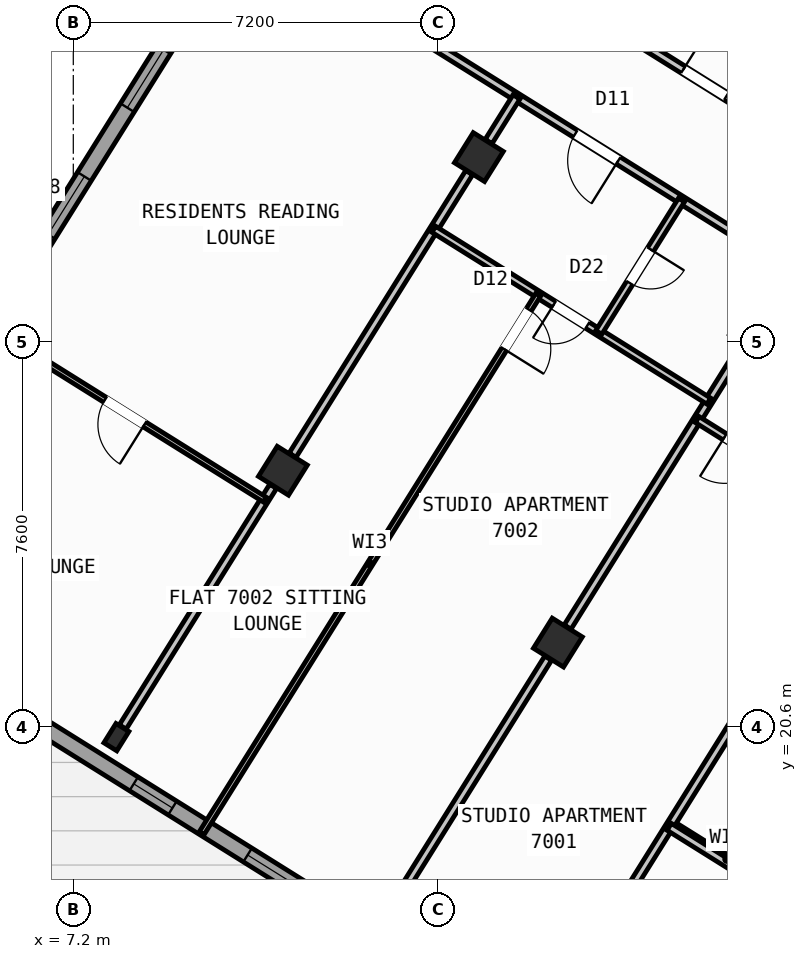
"""IFC4 building model, lengths in metres.
Left out: names, types, materials, properties, quantities, classifications, styles, units other than length and angle.
Written with IfcOpenShell. Run it as: python <this file> out.ifc"""

import sys

from ifc_helpers import new_model, si_unit, direction, frame, frame_2d, origin, origin_2d, place, context, subcontext, project, spatial, rectangle, hollow_rectangle, i_section, extrude, source, transform, mapped, element, fill, save


model = new_model("IFC4")
c1 = context("Model", 3, precision=1e-05, world=origin(), true_north=direction((0.0, 1.0)))
c2 = subcontext(c1, "Body", "Model", "MODEL_VIEW")
j1 = project(units=[si_unit("LENGTHUNIT", "METRE"), si_unit("PLANEANGLEUNIT", "RADIAN")], contexts=[c1])
p1 = place(None, origin())
s1 = spatial("IfcSite", under=j1, at=p1, CompositionType="ELEMENT")
p2 = place(p1, origin())
s2 = spatial("IfcBuilding", under=s1, at=p2, CompositionType="ELEMENT")
p3 = place(p2, frame((0.0, 0.0, 277.2)))
s3 = spatial("IfcBuildingStorey", under=s2, at=p3, CompositionType="ELEMENT", Elevation=277.2)
m1 = source(origin(), c2, "Body", "SweptSolid", [
    extrude(hollow_rectangle(XDim=0.7, YDim=0.7, WallThickness=0.028, at=origin_2d()), origin(), (0.0, 0.0, 1.0), 3.6),
])
for number, where, z_axis, x_axis in (
    (1, (16.764, 22.261, 0.0), (0.0, 0.0, 1.0), (-0.848, 0.53, 0.0)),
    (2, (15.205, 31.844, 0.0), (0.0, 0.0, 1.0), (-0.848, 0.53, 0.0)),
    (3, (11.336, 25.653, 0.0), (0.0, 0.0, 1.0), (-0.848, 0.53, 0.0)),
):
    element("IfcColumn", number, at=place(p3, frame(where, z_axis=z_axis, x_axis=x_axis)), inside=s3, PredefinedType="COLUMN", context=c2, shape_type="MappedRepresentation", body=[
        mapped(m1, transform((0.0, 0.0, 0.0), scale=1.0)),
    ])
m2 = source(origin(), c2, "Body", "SweptSolid", [
    extrude(i_section(OverallWidth=0.3, OverallDepth=0.45, WebThickness=0.014, FlangeThickness=0.026, at=origin_2d()), origin(), (0.0, 0.0, 1.0), 3.6),
])
p4 = place(p3, frame((8.051, 20.395, 0.0), z_axis=(0.0, 0.0, 1.0), x_axis=(-0.848048096156, 0.529919264233, 0.0)))
e4 = element("IfcColumn", 4, at=p4, inside=s3, PredefinedType="COLUMN", context=c2, shape_type="MappedRepresentation", body=[
    mapped(m2, transform((0.0, 0.0, 0.0), scale=1.0)),
])
p5 = place(p3, frame((29.268, 6.429, 0.0), z_axis=(0.0, 0.0, 1.0), x_axis=(-0.848049971435, 0.529916263149, 0.0)))
e5 = element("IfcWall", 5, at=p5, inside=s3, PredefinedType="STANDARD", context=c2, shape_type="SweptSolid", body=[
    extrude(rectangle(XDim=31.588, YDim=0.32, at=frame_2d((15.794, 0.0))), origin(), (0.0, 0.0, 1.0), 3.35),
])
p6 = place(p5, frame((16.362, 0.0, 0.0)))
e6 = element("IfcOpeningElement", 6, at=p6, cuts=e5, PredefinedType="OPENING", context=c2, shape_type="SweptSolid", body=[
    extrude(rectangle(XDim=1.2, YDim=2.15, at=frame_2d((0.6, 1.075))), frame((0.0, 0.17, 0.0), z_axis=(0.0, -1.0, 0.0), x_axis=(1.0, 0.0, 0.0)), (0.0, 0.0, 1.0), 0.34),
])
p7 = place(p5, frame((3.859, 0.0, 0.9)))
e7 = element("IfcOpeningElement", 7, at=p7, cuts=e5, PredefinedType="OPENING", context=c2, shape_type="SweptSolid", body=[
    extrude(rectangle(XDim=1.65, YDim=1.45, at=frame_2d((0.825, 0.725))), frame((0.0, 0.17, 0.0), z_axis=(0.0, -1.0, 0.0), x_axis=(1.0, 0.0, 0.0)), (0.0, 0.0, 1.0), 0.34),
])
p8 = place(p5, frame((10.519, 0.0, 0.9)))
e8 = element("IfcOpeningElement", 8, at=p8, cuts=e5, PredefinedType="OPENING", context=c2, shape_type="SweptSolid", body=[
    extrude(rectangle(XDim=1.65, YDim=1.45, at=frame_2d((0.825, 0.725))), frame((0.0, 0.17, 0.0), z_axis=(0.0, -1.0, 0.0), x_axis=(1.0, 0.0, 0.0)), (0.0, 0.0, 1.0), 0.34),
])
p9 = place(p5, frame((20.015, 0.0, 0.95)))
e9 = element("IfcOpeningElement", 9, at=p9, cuts=e5, PredefinedType="OPENING", context=c2, shape_type="SweptSolid", body=[
    extrude(rectangle(XDim=1.95, YDim=1.35, at=frame_2d((0.975, 0.675))), frame((0.0, 0.17, 0.0), z_axis=(0.0, -1.0, 0.0), x_axis=(1.0, 0.0, 0.0)), (0.0, 0.0, 1.0), 0.34),
])
p10 = place(p5, frame((23.715, 0.0, 1.0)))
e10 = element("IfcOpeningElement", 10, at=p10, cuts=e5, PredefinedType="OPENING", context=c2, shape_type="SweptSolid", body=[
    extrude(rectangle(XDim=0.9, YDim=1.25, at=frame_2d((0.45, 0.625))), frame((0.0, 0.17, 0.0), z_axis=(0.0, -1.0, 0.0), x_axis=(1.0, 0.0, 0.0)), (0.0, 0.0, 1.0), 0.34),
])
p11 = place(p5, frame((27.706, 0.0, 0.9)))
e11 = element("IfcOpeningElement", 11, at=p11, cuts=e5, PredefinedType="OPENING", context=c2, shape_type="SweptSolid", body=[
    extrude(rectangle(XDim=1.65, YDim=1.45, at=frame_2d((0.825, 0.725))), frame((0.0, 0.17, 0.0), z_axis=(0.0, -1.0, 0.0), x_axis=(1.0, 0.0, 0.0)), (0.0, 0.0, 1.0), 0.34),
])
p12 = place(p3, frame((2.415, 23.452, 0.0), z_axis=(0.0, 0.0, 1.0), x_axis=(0.52991049553, 0.848053575387, 0.0)))
e12 = element("IfcWall", 12, at=p12, inside=s3, PredefinedType="STANDARD", context=c2, shape_type="SweptSolid", body=[
    extrude(rectangle(XDim=21.587, YDim=0.32, at=frame_2d((10.794, 0.0))), origin(), (0.0, 0.0, 1.0), 3.35),
])
p13 = place(p12, frame((2.368, 0.0, 0.9)))
e13 = element("IfcOpeningElement", 13, at=p13, cuts=e12, PredefinedType="OPENING", context=c2, shape_type="SweptSolid", body=[
    extrude(rectangle(XDim=1.65, YDim=1.45, at=frame_2d((0.825, 0.725))), frame((0.0, 0.17, 0.0), z_axis=(0.0, -1.0, 0.0), x_axis=(1.0, 0.0, 0.0)), (0.0, 0.0, 1.0), 0.34),
])
p14 = place(p12, frame((8.094, 0.0, 0.9)))
e14 = element("IfcOpeningElement", 14, at=p14, cuts=e12, PredefinedType="OPENING", context=c2, shape_type="SweptSolid", body=[
    extrude(rectangle(XDim=1.35, YDim=1.45, at=frame_2d((0.675, 0.725))), frame((0.0, 0.17, 0.0), z_axis=(0.0, -1.0, 0.0), x_axis=(1.0, 0.0, 0.0)), (0.0, 0.0, 1.0), 0.34),
])
p15 = place(p12, frame((11.044, 0.0, 0.9)))
e15 = element("IfcOpeningElement", 15, at=p15, cuts=e12, PredefinedType="OPENING", context=c2, shape_type="SweptSolid", body=[
    extrude(rectangle(XDim=1.35, YDim=1.45, at=frame_2d((0.675, 0.725))), frame((0.0, 0.17, 0.0), z_axis=(0.0, -1.0, 0.0), x_axis=(1.0, 0.0, 0.0)), (0.0, 0.0, 1.0), 0.34),
])
p16 = place(p12, frame((18.809, 0.0, 1.0)))
e16 = element("IfcOpeningElement", 16, at=p16, cuts=e12, PredefinedType="OPENING", context=c2, shape_type="SweptSolid", body=[
    extrude(rectangle(XDim=0.9, YDim=1.25, at=frame_2d((0.45, 0.625))), frame((0.0, 0.17, 0.0), z_axis=(0.0, -1.0, 0.0), x_axis=(1.0, 0.0, 0.0)), (0.0, 0.0, 1.0), 0.34),
])
p17 = place(p3, frame((14.138, 41.825, 0.0), z_axis=(0.0, 0.0, 1.0), x_axis=(0.848046498049, -0.529921821731, 0.0)))
e17 = element("IfcWall", 17, at=p17, inside=s3, PredefinedType="STANDARD", context=c2, shape_type="SweptSolid", body=[
    extrude(rectangle(XDim=31.588, YDim=0.32, at=frame_2d((15.794, 0.0))), origin(), (0.0, 0.0, 1.0), 3.35),
])
p18 = place(p17, frame((3.568, 0.0, 0.0)))
e18 = element("IfcOpeningElement", 18, at=p18, cuts=e17, PredefinedType="OPENING", context=c2, shape_type="SweptSolid", body=[
    extrude(rectangle(XDim=1.05, YDim=2.15, at=frame_2d((0.525, 1.075))), frame((0.0, 0.17, 0.0), z_axis=(0.0, -1.0, 0.0), x_axis=(1.0, 0.0, 0.0)), (0.0, 0.0, 1.0), 0.34),
])
p19 = place(p17, frame((1.046, 0.0, 0.9)))
e19 = element("IfcOpeningElement", 19, at=p19, cuts=e17, PredefinedType="OPENING", context=c2, shape_type="SweptSolid", body=[
    extrude(rectangle(XDim=1.65, YDim=1.45, at=frame_2d((0.825, 0.725))), frame((0.0, 0.17, 0.0), z_axis=(0.0, -1.0, 0.0), x_axis=(1.0, 0.0, 0.0)), (0.0, 0.0, 1.0), 0.34),
])
p20 = place(p17, frame((8.61, 0.0, 0.9)))
e20 = element("IfcOpeningElement", 20, at=p20, cuts=e17, PredefinedType="OPENING", context=c2, shape_type="SweptSolid", body=[
    extrude(rectangle(XDim=1.35, YDim=1.45, at=frame_2d((0.675, 0.725))), frame((0.0, 0.17, 0.0), z_axis=(0.0, -1.0, 0.0), x_axis=(1.0, 0.0, 0.0)), (0.0, 0.0, 1.0), 0.34),
])
p21 = place(p17, frame((13.599, 0.0, 0.95)))
e21 = element("IfcOpeningElement", 21, at=p21, cuts=e17, PredefinedType="OPENING", context=c2, shape_type="SweptSolid", body=[
    extrude(rectangle(XDim=1.95, YDim=1.35, at=frame_2d((0.975, 0.675))), frame((0.0, 0.17, 0.0), z_axis=(0.0, -1.0, 0.0), x_axis=(1.0, 0.0, 0.0)), (0.0, 0.0, 1.0), 0.34),
])
p22 = place(p17, frame((17.154, 0.0, 1.0)))
e22 = element("IfcOpeningElement", 22, at=p22, cuts=e17, PredefinedType="OPENING", context=c2, shape_type="SweptSolid", body=[
    extrude(rectangle(XDim=0.9, YDim=1.25, at=frame_2d((0.45, 0.625))), frame((0.0, 0.17, 0.0), z_axis=(0.0, -1.0, 0.0), x_axis=(1.0, 0.0, 0.0)), (0.0, 0.0, 1.0), 0.34),
])
p23 = place(p17, frame((21.719, 0.0, 0.9)))
e23 = element("IfcOpeningElement", 23, at=p23, cuts=e17, PredefinedType="OPENING", context=c2, shape_type="SweptSolid", body=[
    extrude(rectangle(XDim=1.65, YDim=1.45, at=frame_2d((0.825, 0.725))), frame((0.0, 0.17, 0.0), z_axis=(0.0, -1.0, 0.0), x_axis=(1.0, 0.0, 0.0)), (0.0, 0.0, 1.0), 0.34),
])
p24 = place(p17, frame((27.419, 0.0, 0.9)))
e24 = element("IfcOpeningElement", 24, at=p24, cuts=e17, PredefinedType="OPENING", context=c2, shape_type="SweptSolid", body=[
    extrude(rectangle(XDim=1.65, YDim=1.45, at=frame_2d((0.825, 0.725))), frame((0.0, 0.17, 0.0), z_axis=(0.0, -1.0, 0.0), x_axis=(1.0, 0.0, 0.0)), (0.0, 0.0, 1.0), 0.34),
])
p25 = place(p3, frame((21.206, 17.292, 0.0), z_axis=(0.0, 0.0, 1.0), x_axis=(-0.848050851465, 0.529914854792, 0.0)))
e25 = element("IfcWall", 25, at=p25, inside=s3, PredefinedType="PARTITIONING", context=c2, shape_type="SweptSolid", body=[
    extrude(rectangle(XDim=2.61, YDim=0.16, at=frame_2d((1.305, 0.0))), origin(), (0.0, 0.0, 1.0), 3.34),
])
p26 = place(p3, frame((24.588, 27.631, 0.0), z_axis=(0.0, 0.0, 1.0), x_axis=(-0.529914586043, -0.848051019396, 0.0)))
e26 = element("IfcWall", 26, at=p26, inside=s3, PredefinedType="PARTITIONING", context=c2, shape_type="SweptSolid", body=[
    extrude(rectangle(XDim=15.35, YDim=0.16, at=frame_2d((7.675, 0.0))), origin(), (0.0, 0.0, 1.0), 3.34),
])
p27 = place(p3, frame((25.754, 29.497, 0.0), z_axis=(0.0, 0.0, 1.0), x_axis=(-0.848045850158, 0.529922858565, 0.0)))
e27 = element("IfcWall", 27, at=p27, inside=s3, PredefinedType="PARTITIONING", context=c2, shape_type="SweptSolid", body=[
    extrude(rectangle(XDim=16.73, YDim=0.16, at=frame_2d((8.365, 0.0))), origin(), (0.0, 0.0, 1.0), 3.34),
])
p28 = place(p27, frame((1.588, 0.0, 0.0)))
e28 = element("IfcOpeningElement", 28, at=p28, cuts=e27, PredefinedType="OPENING", context=c2, shape_type="SweptSolid", body=[
    extrude(rectangle(XDim=1.0, YDim=2.1, at=frame_2d((0.5, 1.05))), frame((0.0, 0.09, 0.0), z_axis=(0.0, -1.0, 0.0), x_axis=(1.0, 0.0, 0.0)), (0.0, 0.0, 1.0), 0.18),
])
p29 = place(p27, frame((6.685, 0.0, 0.0)))
e29 = element("IfcOpeningElement", 29, at=p29, cuts=e27, PredefinedType="OPENING", context=c2, shape_type="SweptSolid", body=[
    extrude(rectangle(XDim=1.0, YDim=2.1, at=frame_2d((0.5, 1.05))), frame((0.0, 0.09, 0.0), z_axis=(0.0, -1.0, 0.0), x_axis=(1.0, 0.0, 0.0)), (0.0, 0.0, 1.0), 0.18),
])
p30 = place(p27, frame((12.951, 0.0, 0.0)))
e30 = element("IfcOpeningElement", 30, at=p30, cuts=e27, PredefinedType="OPENING", context=c2, shape_type="SweptSolid", body=[
    extrude(rectangle(XDim=1.0, YDim=2.1, at=frame_2d((0.5, 1.05))), frame((0.0, 0.09, 0.0), z_axis=(0.0, -1.0, 0.0), x_axis=(1.0, 0.0, 0.0)), (0.0, 0.0, 1.0), 0.18),
])
p31 = place(p3, frame((24.588, 27.631, 0.0), z_axis=(0.0, 0.0, 1.0), x_axis=(-0.848041752158, 0.529929416617, 0.0)))
e31 = element("IfcWall", 31, at=p31, inside=s3, PredefinedType="PARTITIONING", context=c2, shape_type="SweptSolid", body=[
    extrude(rectangle(XDim=16.73, YDim=0.16, at=frame_2d((8.365, 0.0))), origin(), (0.0, 0.0, 1.0), 3.34),
])
p32 = place(p31, frame((2.22, 0.0, 0.0)))
e32 = element("IfcOpeningElement", 32, at=p32, cuts=e31, PredefinedType="OPENING", context=c2, shape_type="SweptSolid", body=[
    extrude(rectangle(XDim=0.86, YDim=2.05, at=frame_2d((0.43, 1.025))), frame((0.0, 0.09, 0.0), z_axis=(0.0, -1.0, 0.0), x_axis=(1.0, 0.0, 0.0)), (0.0, 0.0, 1.0), 0.18),
])
p33 = place(p31, frame((7.82, 0.0, 0.0)))
e33 = element("IfcOpeningElement", 33, at=p33, cuts=e31, PredefinedType="OPENING", context=c2, shape_type="SweptSolid", body=[
    extrude(rectangle(XDim=1.0, YDim=2.1, at=frame_2d((0.5, 1.05))), frame((0.0, 0.09, 0.0), z_axis=(0.0, -1.0, 0.0), x_axis=(1.0, 0.0, 0.0)), (0.0, 0.0, 1.0), 0.18),
])
p34 = place(p31, frame((12.95, 0.0, 0.0)))
e34 = element("IfcOpeningElement", 34, at=p34, cuts=e31, PredefinedType="OPENING", context=c2, shape_type="SweptSolid", body=[
    extrude(rectangle(XDim=1.0, YDim=2.1, at=frame_2d((0.5, 1.05))), frame((0.0, 0.09, 0.0), z_axis=(0.0, -1.0, 0.0), x_axis=(1.0, 0.0, 0.0)), (0.0, 0.0, 1.0), 0.18),
])
p35 = place(p3, frame((20.44, 28.145, 0.0), z_axis=(0.0, 0.0, 1.0), x_axis=(-0.529938869374, -0.84803584519, 0.0)))
e35 = element("IfcWall", 35, at=p35, inside=s3, PredefinedType="PARTITIONING", context=c2, shape_type="SweptSolid", body=[
    extrude(rectangle(XDim=6.576, YDim=0.16, at=frame_2d((3.288, 0.0))), origin(), (0.0, 0.0, 1.0), 2.875),
])
p36 = place(p3, frame((16.572, 21.954, 0.0), z_axis=(0.0, 0.0, 1.0), x_axis=(-0.529904903214, -0.848057069748, 0.0)))
e36 = element("IfcWall", 36, at=p36, inside=s3, PredefinedType="PARTITIONING", context=c2, shape_type="SweptSolid", body=[
    extrude(rectangle(XDim=5.601, YDim=0.16, at=frame_2d((2.801, 0.0))), origin(), (0.0, 0.0, 1.0), 2.875),
])
p37 = place(p3, frame((22.728, 24.654, 0.0), z_axis=(0.0, 0.0, 1.0), x_axis=(-0.848059820872, 0.529900500304, 0.0)))
e37 = element("IfcWall", 37, at=p37, inside=s3, PredefinedType="PLUMBINGWALL", context=c2, shape_type="SweptSolid", body=[
    extrude(rectangle(XDim=3.79, YDim=0.14, at=frame_2d((1.895, 0.0))), origin(), (0.0, 0.0, 1.0), 3.34),
])
p38 = place(p37, frame((2.23, 0.0, 0.0)))
e38 = element("IfcOpeningElement", 38, at=p38, cuts=e37, PredefinedType="OPENING", context=c2, shape_type="SweptSolid", body=[
    extrude(rectangle(XDim=0.92, YDim=2.08, at=frame_2d((0.46, 1.04))), frame((0.0, 0.08, 0.0), z_axis=(0.0, -1.0, 0.0), x_axis=(1.0, 0.0, 0.0)), (0.0, 0.0, 1.0), 0.16),
])
p39 = place(p3, frame((15.946, 33.031, 0.0), z_axis=(0.0, 0.0, 1.0), x_axis=(-0.529977795385, -0.848011519025, 0.0)))
e39 = element("IfcWall", 39, at=p39, inside=s3, PredefinedType="PARTITIONING", context=c2, shape_type="SweptSolid", body=[
    extrude(rectangle(XDim=1.038, YDim=0.16, at=frame_2d((0.519, 0.0))), origin(), (0.0, 0.0, 1.0), 2.875),
])
p40 = place(p3, frame((15.013, 31.537, 0.0), z_axis=(0.0, 0.0, 1.0), x_axis=(-0.529922185033, -0.848046271031, 0.0)))
e40 = element("IfcWall", 40, at=p40, inside=s3, PredefinedType="PARTITIONING", context=c2, shape_type="SweptSolid", body=[
    extrude(rectangle(XDim=6.576, YDim=0.16, at=frame_2d((3.288, 0.0))), origin(), (0.0, 0.0, 1.0), 2.875),
])
p41 = place(p3, frame((11.144, 25.346, 0.0), z_axis=(0.0, 0.0, 1.0), x_axis=(-0.529904903214, -0.848057069748, 0.0)))
e41 = element("IfcWall", 41, at=p41, inside=s3, PredefinedType="PARTITIONING", context=c2, shape_type="SweptSolid", body=[
    extrude(rectangle(XDim=5.601, YDim=0.16, at=frame_2d((2.801, 0.0))), origin(), (0.0, 0.0, 1.0), 2.875),
])
p42 = place(p3, frame((19.742, 27.027, 0.0), z_axis=(0.0, 0.0, 1.0), x_axis=(-0.848039019877, 0.529933789039, 0.0)))
e42 = element("IfcWall", 42, at=p42, inside=s3, PredefinedType="PLUMBINGWALL", context=c2, shape_type="SweptSolid", body=[
    extrude(rectangle(XDim=6.4, YDim=0.14, at=frame_2d((3.2, 0.0))), origin(), (0.0, 0.0, 1.0), 3.34),
])
p43 = place(p42, frame((2.824, 0.0, 0.0)))
e43 = element("IfcOpeningElement", 43, at=p43, cuts=e42, PredefinedType="OPENING", context=c2, shape_type="SweptSolid", body=[
    extrude(rectangle(XDim=0.78, YDim=2.05, at=frame_2d((0.39, 1.025))), frame((0.0, 0.08, 0.0), z_axis=(0.0, -1.0, 0.0), x_axis=(1.0, 0.0, 0.0)), (0.0, 0.0, 1.0), 0.16),
])
p44 = place(p3, frame((19.203, 30.996, 0.0), z_axis=(0.0, 0.0, 1.0), x_axis=(-0.52992768316, -0.848042835369, 0.0)))
e44 = element("IfcWall", 44, at=p44, inside=s3, PredefinedType="PLUMBINGWALL", context=c2, shape_type="SweptSolid", body=[
    extrude(rectangle(XDim=3.08, YDim=0.14, at=frame_2d((1.54, 0.0))), origin(), (0.0, 0.0, 1.0), 3.34),
])
p45 = place(p44, frame((1.15, 0.0, 0.0)))
e45 = element("IfcOpeningElement", 45, at=p45, cuts=e44, PredefinedType="OPENING", context=c2, shape_type="SweptSolid", body=[
    extrude(rectangle(XDim=0.78, YDim=2.05, at=frame_2d((0.39, 1.025))), frame((0.0, 0.08, 0.0), z_axis=(0.0, -1.0, 0.0), x_axis=(1.0, 0.0, 0.0)), (0.0, 0.0, 1.0), 0.16),
])
p46 = place(p3, frame((16.377, 29.13, 0.0), z_axis=(0.0, 0.0, 1.0), x_axis=(-0.529923687379, -0.848045332252, 0.0)))
e46 = element("IfcWall", 46, at=p46, inside=s3, PredefinedType="PARTITIONING", context=c2, shape_type="SweptSolid", body=[
    extrude(rectangle(XDim=12.54, YDim=0.11, at=frame_2d((6.27, 0.0))), origin(), (0.0, 0.0, 1.0), 3.34),
])
p47 = place(p46, frame((0.35, 0.0, 0.0)))
e47 = element("IfcOpeningElement", 47, at=p47, cuts=e46, PredefinedType="OPENING", context=c2, shape_type="SweptSolid", body=[
    extrude(rectangle(XDim=0.92, YDim=2.08, at=frame_2d((0.46, 1.04))), frame((0.0, 0.065, 0.0), z_axis=(0.0, -1.0, 0.0), x_axis=(1.0, 0.0, 0.0)), (0.0, 0.0, 1.0), 0.13),
])
p48 = place(p3, frame((10.98, 25.083, 0.0), z_axis=(0.0, 0.0, 1.0), x_axis=(-0.848048787466, 0.529918157905, 0.0)))
e48 = element("IfcWall", 48, at=p48, inside=s3, PredefinedType="PARTITIONING", context=c2, shape_type="SweptSolid", body=[
    extrude(rectangle(XDim=6.52, YDim=0.11, at=frame_2d((3.26, 0.0))), origin(), (0.0, 0.0, 1.0), 3.34),
])
p49 = place(p48, frame((2.8, 0.0, 0.0)))
e49 = element("IfcOpeningElement", 49, at=p49, cuts=e48, PredefinedType="OPENING", context=c2, shape_type="SweptSolid", body=[
    extrude(rectangle(XDim=0.92, YDim=2.08, at=frame_2d((0.46, 1.04))), frame((0.0, 0.065, 0.0), z_axis=(0.0, -1.0, 0.0), x_axis=(1.0, 0.0, 0.0)), (0.0, 0.0, 1.0), 0.13),
])
p50 = place(p3, frame((32.164, 10.374, 0.0), z_axis=(0.0, 0.0, 1.0), x_axis=(-0.848044107957, 0.529925646633, 0.0)))
e50 = element("IfcWall", 50, at=p50, inside=s3, PredefinedType="PARTITIONING", context=c2, shape_type="SweptSolid", body=[
    extrude(rectangle(XDim=15.57, YDim=0.16, at=frame_2d((7.785, 0.0))), origin(), (0.0, 0.0, 1.0), 3.34),
])
p51 = place(p50, frame((10.83, 0.0, 0.0)))
e51 = element("IfcOpeningElement", 51, at=p51, cuts=e50, PredefinedType="OPENING", context=c2, shape_type="SweptSolid", body=[
    extrude(rectangle(XDim=1.0, YDim=2.1, at=frame_2d((0.5, 1.05))), frame((0.0, 0.09, 0.0), z_axis=(0.0, -1.0, 0.0), x_axis=(1.0, 0.0, 0.0)), (0.0, 0.0, 1.0), 0.18),
])
m3 = source(origin(), c2, "Body", "SweptSolid", [
    extrude(rectangle(XDim=1.95, YDim=1.35, at=frame_2d((0.975, 0.675))), frame((0.0, 0.03, 0.0), z_axis=(0.0, -1.0, 0.0), x_axis=(1.0, 0.0, 0.0)), (0.0, 0.0, 1.0), 0.06),
])
p52 = place(p9, origin())
e52 = element("IfcWindow", 52, at=p52, inside=s3, PartitioningType="SINGLE_PANEL", PredefinedType="WINDOW", context=c2, shape_type="MappedRepresentation", body=[
    mapped(m3, transform((0.0, 0.0, 0.0), scale=1.0)),
])
fill(e9, e52)
m4 = source(origin(), c2, "Body", "SweptSolid", [
    extrude(rectangle(XDim=0.9, YDim=1.25, at=frame_2d((0.45, 0.625))), frame((0.0, 0.03, 0.0), z_axis=(0.0, -1.0, 0.0), x_axis=(1.0, 0.0, 0.0)), (0.0, 0.0, 1.0), 0.06),
])
p53 = place(p10, origin())
e53 = element("IfcWindow", 53, at=p53, inside=s3, PartitioningType="SINGLE_PANEL", PredefinedType="WINDOW", context=c2, shape_type="MappedRepresentation", body=[
    mapped(m4, transform((0.0, 0.0, 0.0), scale=1.0)),
])
fill(e10, e53)
m5 = source(origin(), c2, "Body", "SweptSolid", [
    extrude(rectangle(XDim=1.35, YDim=1.45, at=frame_2d((0.675, 0.725))), frame((0.0, 0.03, 0.0), z_axis=(0.0, -1.0, 0.0), x_axis=(1.0, 0.0, 0.0)), (0.0, 0.0, 1.0), 0.06),
])
p54 = place(p14, origin())
e54 = element("IfcWindow", 54, at=p54, inside=s3, PartitioningType="SINGLE_PANEL", PredefinedType="WINDOW", context=c2, shape_type="MappedRepresentation", body=[
    mapped(m5, transform((0.0, 0.0, 0.0), scale=1.0)),
])
fill(e14, e54)
p55 = place(p15, origin())
e55 = element("IfcWindow", 55, at=p55, inside=s3, PartitioningType="SINGLE_PANEL", PredefinedType="WINDOW", context=c2, shape_type="MappedRepresentation", body=[
    mapped(m5, transform((0.0, 0.0, 0.0), scale=1.0)),
])
fill(e15, e55)
m6 = source(origin(), c2, "Body", "SweptSolid", [
    extrude(rectangle(XDim=0.92, YDim=2.08, at=frame_2d((0.46, 1.04))), frame((0.0, 0.025, 0.0), z_axis=(0.0, -1.0, 0.0), x_axis=(1.0, 0.0, 0.0)), (0.0, 0.0, 1.0), 0.05),
])
p56 = place(p38, origin())
e56 = element("IfcDoor", 56, at=p56, inside=s3, OperationType="SINGLE_SWING_RIGHT", PredefinedType="DOOR", context=c2, shape_type="MappedRepresentation", body=[
    mapped(m6, transform((0.0, 0.0, 0.0), scale=1.0)),
])
fill(e38, e56)
p57 = place(p47, origin())
e57 = element("IfcDoor", 57, at=p57, inside=s3, OperationType="SINGLE_SWING_RIGHT", PredefinedType="DOOR", context=c2, shape_type="MappedRepresentation", body=[
    mapped(m6, transform((0.0, 0.0, 0.0), scale=1.0)),
])
fill(e47, e57)
m7 = source(origin(), c2, "Body", "SweptSolid", [
    extrude(rectangle(XDim=1.0, YDim=2.1, at=frame_2d((0.5, 1.05))), frame((0.0, 0.025, 0.0), z_axis=(0.0, -1.0, 0.0), x_axis=(1.0, 0.0, 0.0)), (0.0, 0.0, 1.0), 0.05),
])
p58 = place(p33, origin())
e58 = element("IfcDoor", 58, at=p58, inside=s3, OperationType="SINGLE_SWING_LEFT", PredefinedType="DOOR", context=c2, shape_type="MappedRepresentation", body=[
    mapped(m7, transform((0.0, 0.0, 0.0), scale=1.0)),
])
fill(e33, e58)
m8 = source(origin(), c2, "Body", "SweptSolid", [
    extrude(rectangle(XDim=0.78, YDim=2.05, at=frame_2d((0.39, 1.025))), frame((0.0, 0.025, 0.0), z_axis=(0.0, -1.0, 0.0), x_axis=(1.0, 0.0, 0.0)), (0.0, 0.0, 1.0), 0.05),
])
p59 = place(p43, origin())
e59 = element("IfcDoor", 59, at=p59, inside=s3, OperationType="SINGLE_SWING_RIGHT", PredefinedType="DOOR", context=c2, shape_type="MappedRepresentation", body=[
    mapped(m8, transform((0.0, 0.0, 0.0), scale=1.0)),
])
fill(e43, e59)
p60 = place(p45, origin())
e60 = element("IfcDoor", 60, at=p60, inside=s3, OperationType="SINGLE_SWING_LEFT", PredefinedType="DOOR", context=c2, shape_type="MappedRepresentation", body=[
    mapped(m8, transform((0.0, 0.0, 0.0), scale=1.0)),
])
fill(e45, e60)
p61 = place(p49, origin())
e61 = element("IfcDoor", 61, at=p61, inside=s3, OperationType="SINGLE_SWING_LEFT", PredefinedType="DOOR", context=c2, shape_type="MappedRepresentation", body=[
    mapped(m6, transform((0.0, 0.0, 0.0), scale=1.0)),
])
fill(e49, e61)
p62 = place(p29, frame((1.0, 0.0, 0.0), z_axis=(0.0, 0.0, 1.0), x_axis=(-1.0, 0.0, 0.0)))
e62 = element("IfcDoor", 62, at=p62, inside=s3, OperationType="SINGLE_SWING_LEFT", PredefinedType="DOOR", context=c2, shape_type="MappedRepresentation", body=[
    mapped(m7, transform((0.0, 0.0, 0.0), scale=1.0)),
])
fill(e29, e62)
save(model, sys.argv[1])
